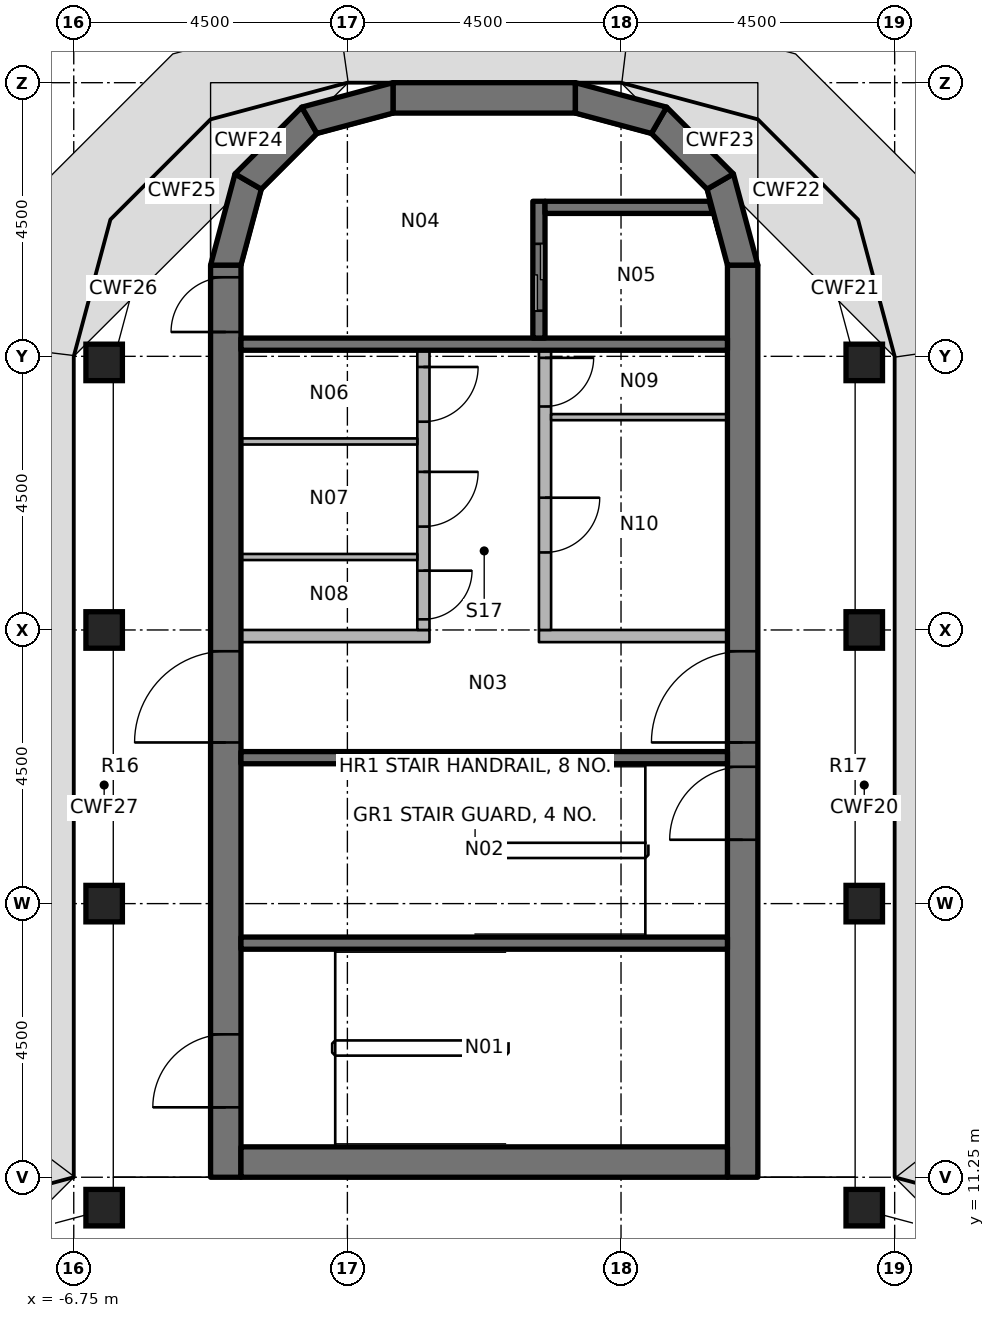
"""IFC4 building model, lengths in metres.
Left out: names, types, materials, properties, quantities, classifications, styles, units other than length and angle.
Written with IfcOpenShell. Run it as: python <this file> out.ifc"""

import sys

from ifc_helpers import new_model, si_unit, direction, frame, frame_2d, origin, origin_2d, place, context, subcontext, project, spatial, polyline, rectangle, outline, extrude, element, fill, save


model = new_model("IFC4")
c1 = context("Model", 3, precision=1e-05, world=origin(), true_north=direction((0.0, 1.0)))
c2 = subcontext(c1, "Body", "Model", "MODEL_VIEW")
j1 = project(units=[si_unit("LENGTHUNIT", "METRE"), si_unit("PLANEANGLEUNIT", "RADIAN")], contexts=[c1])
p1 = place(None, origin())
s1 = spatial("IfcSite", under=j1, at=p1, CompositionType="ELEMENT")
p2 = place(p1, origin())
s2 = spatial("IfcBuilding", under=s1, at=p2, CompositionType="ELEMENT")
p3 = place(p2, frame((0.0, 0.0, 291.6)))
s3 = spatial("IfcBuildingStorey", under=s2, at=p3, CompositionType="ELEMENT", Elevation=291.6)
for number, where, z_axis, x_axis in (
    (1, (-6.25, 10.75, 0.0), (0.0, 0.0, 1.0), (1.0, 0.0, 0.0)),
    (2, (-6.25, 15.75, 0.0), (0.0, 0.0, 1.0), (1.0, 0.0, 0.0)),
    (3, (-6.25, 20.25, 0.0), (0.0, 0.0, 1.0), (1.0, 0.0, 0.0)),
    (4, (-6.25, 24.65, 0.0), (0.0, 0.0, 1.0), (1.0, 0.0, 0.0)),
    (5, (6.25, 10.75, 0.0), (0.0, 0.0, 1.0), (1.0, 0.0, 0.0)),
    (6, (6.25, 15.75, 0.0), (0.0, 0.0, 1.0), (1.0, 0.0, 0.0)),
    (7, (6.25, 20.25, 0.0), (0.0, 0.0, 1.0), (1.0, 0.0, 0.0)),
    (8, (6.25, 24.65, 0.0), (0.0, 0.0, 1.0), (1.0, 0.0, 0.0)),
):
    element("IfcColumn", number, at=place(p3, frame(where, z_axis=z_axis, x_axis=x_axis)), inside=s3, PredefinedType="COLUMN", context=c2, shape_type="SweptSolid", body=[
        extrude(rectangle(XDim=0.6, YDim=0.6, at=origin_2d()), origin(), (0.0, 0.0, 1.0), 3.45),
    ])
p4 = place(p3, frame((-4.25, 11.25, 0.0), z_axis=(0.0, 0.0, 1.0), x_axis=(0.0, 1.0, 0.0)))
e9 = element("IfcWall", 9, at=p4, inside=s3, PredefinedType="SHEAR", context=c2, shape_type="SweptSolid", body=[
    extrude(rectangle(XDim=15.0, YDim=0.5, at=frame_2d((7.5, 0.0))), origin(), (0.0, 0.0, 1.0), 3.6),
])
p5 = place(p4, frame((7.15, 0.0, 0.0)))
e10 = element("IfcOpeningElement", 10, at=p5, cuts=e9, PredefinedType="OPENING", context=c2, shape_type="SweptSolid", body=[
    extrude(rectangle(XDim=1.5, YDim=2.3, at=frame_2d((0.75, 1.15))), frame((0.0, 0.26, 0.0), z_axis=(0.0, -1.0, 0.0), x_axis=(1.0, 0.0, 0.0)), (0.0, 0.0, 1.0), 0.52),
])
p6 = place(p4, frame((13.9, 0.0, 0.0)))
e11 = element("IfcOpeningElement", 11, at=p6, cuts=e9, PredefinedType="OPENING", context=c2, shape_type="SweptSolid", body=[
    extrude(rectangle(XDim=0.9, YDim=2.1, at=frame_2d((0.45, 1.05))), frame((0.0, 0.26, 0.0), z_axis=(0.0, -1.0, 0.0), x_axis=(1.0, 0.0, 0.0)), (0.0, 0.0, 1.0), 0.52),
])
p7 = place(p4, frame((1.15, 0.0, 0.0)))
e12 = element("IfcOpeningElement", 12, at=p7, cuts=e9, PredefinedType="OPENING", context=c2, shape_type="SweptSolid", body=[
    extrude(rectangle(XDim=1.2, YDim=2.1, at=frame_2d((0.6, 1.05))), frame((0.0, 0.26, 0.0), z_axis=(0.0, -1.0, 0.0), x_axis=(1.0, 0.0, 0.0)), (0.0, 0.0, 1.0), 0.52),
])
p8 = place(p3, frame((4.25, 11.25, 0.0), z_axis=(0.0, 0.0, 1.0), x_axis=(0.0, 1.0, 0.0)))
e13 = element("IfcWall", 13, at=p8, inside=s3, PredefinedType="SHEAR", context=c2, shape_type="SweptSolid", body=[
    extrude(rectangle(XDim=15.0, YDim=0.5, at=frame_2d((7.5, 0.0))), origin(), (0.0, 0.0, 1.0), 3.6),
])
p9 = place(p8, frame((7.15, 0.0, 0.0)))
e14 = element("IfcOpeningElement", 14, at=p9, cuts=e13, PredefinedType="OPENING", context=c2, shape_type="SweptSolid", body=[
    extrude(rectangle(XDim=1.5, YDim=2.3, at=frame_2d((0.75, 1.15))), frame((0.0, 0.26, 0.0), z_axis=(0.0, -1.0, 0.0), x_axis=(1.0, 0.0, 0.0)), (0.0, 0.0, 1.0), 0.52),
])
p10 = place(p8, frame((5.55, 0.0, 0.0)))
e15 = element("IfcOpeningElement", 15, at=p10, cuts=e13, PredefinedType="OPENING", context=c2, shape_type="SweptSolid", body=[
    extrude(rectangle(XDim=1.2, YDim=2.1, at=frame_2d((0.6, 1.05))), frame((0.0, 0.26, 0.0), z_axis=(0.0, -1.0, 0.0), x_axis=(1.0, 0.0, 0.0)), (0.0, 0.0, 1.0), 0.52),
])
p11 = place(p3, frame((-4.0, 11.5, 0.0), z_axis=(0.0, 0.0, 1.0), x_axis=(1.0, 0.0, 0.0)))
e16 = element("IfcWall", 16, at=p11, inside=s3, PredefinedType="SHEAR", context=c2, shape_type="SweptSolid", body=[
    extrude(rectangle(XDim=8.0, YDim=0.5, at=frame_2d((4.0, 0.0))), origin(), (0.0, 0.0, 1.0), 3.6),
])
p12 = place(p3, frame((-1.5, 29.0, 0.0), z_axis=(0.0, 0.0, 1.0), x_axis=(1.0, 0.0, 0.0)))
e17 = element("IfcWall", 17, at=p12, inside=s3, PredefinedType="SHEAR", context=c2, shape_type="SweptSolid", body=[
    extrude(rectangle(XDim=3.0, YDim=0.5, at=frame_2d((1.5, 0.0))), origin(), (0.0, 0.0, 1.0), 3.6),
])
p13 = place(p3, origin())
e18 = element("IfcWall", 18, at=p13, inside=s3, PredefinedType="SHEAR", context=c2, shape_type="SweptSolid", body=[
    extrude(outline(polyline([(-4.5, 26.25), (-4.098, 27.75), (-3.665, 27.5), (-4.0, 26.25), (-4.5, 26.25)])), origin(), (0.0, 0.0, 1.0), 3.6),
])
p14 = place(p3, origin())
e19 = element("IfcWall", 19, at=p14, inside=s3, PredefinedType="SHEAR", context=c2, shape_type="SweptSolid", body=[
    extrude(outline(polyline([(-4.098, 27.75), (-3.0, 28.848), (-2.75, 28.415), (-3.665, 27.5), (-4.098, 27.75)])), origin(), (0.0, 0.0, 1.0), 3.6),
])
p15 = place(p3, origin())
e20 = element("IfcWall", 20, at=p15, inside=s3, PredefinedType="SHEAR", context=c2, shape_type="SweptSolid", body=[
    extrude(outline(polyline([(-3.0, 28.848), (-1.5, 29.25), (-1.5, 28.75), (-2.75, 28.415), (-3.0, 28.848)])), origin(), (0.0, 0.0, 1.0), 3.6),
])
p16 = place(p3, origin())
e21 = element("IfcWall", 21, at=p16, inside=s3, PredefinedType="SHEAR", context=c2, shape_type="SweptSolid", body=[
    extrude(outline(polyline([(4.5, 26.25), (4.098, 27.75), (3.665, 27.5), (4.0, 26.25), (4.5, 26.25)])), origin(), (0.0, 0.0, 1.0), 3.6),
])
p17 = place(p3, origin())
e22 = element("IfcWall", 22, at=p17, inside=s3, PredefinedType="SHEAR", context=c2, shape_type="SweptSolid", body=[
    extrude(outline(polyline([(4.098, 27.75), (3.0, 28.848), (2.75, 28.415), (3.665, 27.5), (4.098, 27.75)])), origin(), (0.0, 0.0, 1.0), 3.6),
])
p18 = place(p3, origin())
e23 = element("IfcWall", 23, at=p18, inside=s3, PredefinedType="SHEAR", context=c2, shape_type="SweptSolid", body=[
    extrude(outline(polyline([(3.0, 28.848), (1.5, 29.25), (1.5, 28.75), (2.75, 28.415), (3.0, 28.848)])), origin(), (0.0, 0.0, 1.0), 3.6),
])
p19 = place(p3, frame((-4.0, 24.95, 0.0), z_axis=(0.0, 0.0, 1.0), x_axis=(1.0, 0.0, 0.0)))
e24 = element("IfcWall", 24, at=p19, inside=s3, PredefinedType="SHEAR", context=c2, shape_type="SweptSolid", body=[
    extrude(rectangle(XDim=8.0, YDim=0.2, at=frame_2d((4.0, 0.0))), origin(), (0.0, 0.0, 1.0), 3.45),
])
p20 = place(p3, frame((0.9, 27.3, 0.0), z_axis=(0.0, 0.0, 1.0), x_axis=(0.0, -1.0, 0.0)))
e25 = element("IfcWall", 25, at=p20, inside=s3, PredefinedType="SHEAR", context=c2, shape_type="SweptSolid", body=[
    extrude(rectangle(XDim=2.25, YDim=0.2, at=frame_2d((1.125, 0.0))), origin(), (0.0, 0.0, 1.0), 3.45),
])
p21 = place(p20, frame((0.7, 0.0, 0.0)))
e26 = element("IfcOpeningElement", 26, at=p21, cuts=e25, PredefinedType="OPENING", context=c2, shape_type="SweptSolid", body=[
    extrude(rectangle(XDim=1.1, YDim=2.3, at=frame_2d((0.55, 1.15))), frame((0.0, 0.11, 0.0), z_axis=(0.0, -1.0, 0.0), x_axis=(1.0, 0.0, 0.0)), (0.0, 0.0, 1.0), 0.22),
])
p22 = place(p3, origin())
e27 = element("IfcWall", 27, at=p22, inside=s3, PredefinedType="SHEAR", context=c2, shape_type="SweptSolid", body=[
    extrude(outline(polyline([(1.0, 27.1), (3.755, 27.1), (3.701, 27.3), (1.0, 27.3), (1.0, 27.1)])), origin(), (0.0, 0.0, 1.0), 3.45),
])
for number, where, z_axis, x_axis in (
    (28, (-4.0, 18.15, 0.0), (0.0, 0.0, 1.0), (1.0, 0.0, 0.0)),
    (29, (-4.0, 15.1, 0.0), (0.0, 0.0, 1.0), (1.0, 0.0, 0.0)),
):
    element("IfcWall", number, at=place(p3, frame(where, z_axis=z_axis, x_axis=x_axis)), inside=s3, PredefinedType="SHEAR", context=c2, shape_type="SweptSolid", body=[
        extrude(rectangle(XDim=8.0, YDim=0.2, at=frame_2d((4.0, 0.0))), origin(), (0.0, 0.0, 1.0), 3.45),
    ])
p23 = place(p3, frame((-4.0, 20.15, 0.0), z_axis=(0.0, 0.0, 1.0), x_axis=(1.0, 0.0, 0.0)))
e30 = element("IfcWall", 30, at=p23, inside=s3, PredefinedType="PARTITIONING", context=c2, shape_type="SweptSolid", body=[
    extrude(rectangle(XDim=3.1, YDim=0.2, at=frame_2d((1.55, 0.0))), origin(), (0.0, 0.0, 1.0), 3.45),
])
p24 = place(p3, frame((-1.0, 24.85, 0.0), z_axis=(0.0, 0.0, 1.0), x_axis=(0.0, -1.0, 0.0)))
e31 = element("IfcWall", 31, at=p24, inside=s3, PredefinedType="PARTITIONING", context=c2, shape_type="SweptSolid", body=[
    extrude(rectangle(XDim=4.6, YDim=0.2, at=frame_2d((2.3, 0.0))), origin(), (0.0, 0.0, 1.0), 3.45),
])
p25 = place(p24, frame((0.275, 0.0, 0.0)))
e32 = element("IfcOpeningElement", 32, at=p25, cuts=e31, PredefinedType="OPENING", context=c2, shape_type="SweptSolid", body=[
    extrude(rectangle(XDim=0.9, YDim=2.1, at=frame_2d((0.45, 1.05))), frame((0.0, 0.11, 0.0), z_axis=(0.0, -1.0, 0.0), x_axis=(1.0, 0.0, 0.0)), (0.0, 0.0, 1.0), 0.22),
])
p26 = place(p24, frame((2.0, 0.0, 0.0)))
e33 = element("IfcOpeningElement", 33, at=p26, cuts=e31, PredefinedType="OPENING", context=c2, shape_type="SweptSolid", body=[
    extrude(rectangle(XDim=0.9, YDim=2.1, at=frame_2d((0.45, 1.05))), frame((0.0, 0.11, 0.0), z_axis=(0.0, -1.0, 0.0), x_axis=(1.0, 0.0, 0.0)), (0.0, 0.0, 1.0), 0.22),
])
p27 = place(p24, frame((3.625, 0.0, 0.0)))
e34 = element("IfcOpeningElement", 34, at=p27, cuts=e31, PredefinedType="OPENING", context=c2, shape_type="SweptSolid", body=[
    extrude(rectangle(XDim=0.8, YDim=2.1, at=frame_2d((0.4, 1.05))), frame((0.0, 0.11, 0.0), z_axis=(0.0, -1.0, 0.0), x_axis=(1.0, 0.0, 0.0)), (0.0, 0.0, 1.0), 0.22),
])
p28 = place(p3, frame((0.9, 20.15, 0.0), z_axis=(0.0, 0.0, 1.0), x_axis=(1.0, 0.0, 0.0)))
e35 = element("IfcWall", 35, at=p28, inside=s3, PredefinedType="PARTITIONING", context=c2, shape_type="SweptSolid", body=[
    extrude(rectangle(XDim=3.1, YDim=0.2, at=frame_2d((1.55, 0.0))), origin(), (0.0, 0.0, 1.0), 3.45),
])
p29 = place(p3, frame((1.0, 24.85, 0.0), z_axis=(0.0, 0.0, 1.0), x_axis=(0.0, -1.0, 0.0)))
e36 = element("IfcWall", 36, at=p29, inside=s3, PredefinedType="PARTITIONING", context=c2, shape_type="SweptSolid", body=[
    extrude(rectangle(XDim=4.6, YDim=0.2, at=frame_2d((2.3, 0.0))), origin(), (0.0, 0.0, 1.0), 3.45),
])
p30 = place(p29, frame((0.125, 0.0, 0.0)))
e37 = element("IfcOpeningElement", 37, at=p30, cuts=e36, PredefinedType="OPENING", context=c2, shape_type="SweptSolid", body=[
    extrude(rectangle(XDim=0.8, YDim=2.1, at=frame_2d((0.4, 1.05))), frame((0.0, 0.11, 0.0), z_axis=(0.0, -1.0, 0.0), x_axis=(1.0, 0.0, 0.0)), (0.0, 0.0, 1.0), 0.22),
])
p31 = place(p29, frame((2.425, 0.0, 0.0)))
e38 = element("IfcOpeningElement", 38, at=p31, cuts=e36, PredefinedType="OPENING", context=c2, shape_type="SweptSolid", body=[
    extrude(rectangle(XDim=0.9, YDim=2.1, at=frame_2d((0.45, 1.05))), frame((0.0, 0.11, 0.0), z_axis=(0.0, -1.0, 0.0), x_axis=(1.0, 0.0, 0.0)), (0.0, 0.0, 1.0), 0.22),
])
for number, where, z_axis, x_axis in (
    (39, (-4.0, 23.35, 0.0), (0.0, 0.0, 1.0), (1.0, 0.0, 0.0)),
    (40, (-4.0, 21.45, 0.0), (0.0, 0.0, 1.0), (1.0, 0.0, 0.0)),
    (41, (1.1, 23.75, 0.0), (0.0, 0.0, 1.0), (1.0, 0.0, 0.0)),
):
    element("IfcWall", number, at=place(p3, frame(where, z_axis=z_axis, x_axis=x_axis)), inside=s3, PredefinedType="PARTITIONING", context=c2, shape_type="SweptSolid", body=[
        extrude(rectangle(XDim=2.9, YDim=0.1, at=frame_2d((1.45, 0.0))), origin(), (0.0, 0.0, 1.0), 3.45),
    ])
p32 = place(p5, origin())
e42 = element("IfcDoor", 42, at=p32, inside=s3, OperationType="DOUBLE_DOOR_SINGLE_SWING", PredefinedType="DOOR", context=c2, shape_type="SweptSolid", body=[
    extrude(rectangle(XDim=1.5, YDim=2.3, at=frame_2d((0.75, 1.15))), frame((0.0, 0.025, 0.0), z_axis=(0.0, -1.0, 0.0), x_axis=(1.0, 0.0, 0.0)), (0.0, 0.0, 1.0), 0.05),
])
fill(e10, e42)
p33 = place(p9, origin())
e43 = element("IfcDoor", 43, at=p33, inside=s3, OperationType="DOUBLE_DOOR_SINGLE_SWING", PredefinedType="DOOR", context=c2, shape_type="SweptSolid", body=[
    extrude(rectangle(XDim=1.5, YDim=2.3, at=frame_2d((0.75, 1.15))), frame((0.0, 0.025, 0.0), z_axis=(0.0, -1.0, 0.0), x_axis=(1.0, 0.0, 0.0)), (0.0, 0.0, 1.0), 0.05),
])
fill(e14, e43)
p34 = place(p6, origin())
e44 = element("IfcDoor", 44, at=p34, inside=s3, OperationType="SINGLE_SWING_LEFT", PredefinedType="DOOR", context=c2, shape_type="SweptSolid", body=[
    extrude(rectangle(XDim=0.9, YDim=2.1, at=frame_2d((0.45, 1.05))), frame((0.0, 0.025, 0.0), z_axis=(0.0, -1.0, 0.0), x_axis=(1.0, 0.0, 0.0)), (0.0, 0.0, 1.0), 0.05),
])
fill(e11, e44)
p35 = place(p10, origin())
e45 = element("IfcDoor", 45, at=p35, inside=s3, OperationType="SINGLE_SWING_RIGHT", PredefinedType="DOOR", context=c2, shape_type="SweptSolid", body=[
    extrude(rectangle(XDim=1.2, YDim=2.1, at=frame_2d((0.6, 1.05))), frame((0.0, 0.025, 0.0), z_axis=(0.0, -1.0, 0.0), x_axis=(1.0, 0.0, 0.0)), (0.0, 0.0, 1.0), 0.05),
])
fill(e15, e45)
p36 = place(p7, origin())
e46 = element("IfcDoor", 46, at=p36, inside=s3, OperationType="SINGLE_SWING_LEFT", PredefinedType="DOOR", context=c2, shape_type="SweptSolid", body=[
    extrude(rectangle(XDim=1.2, YDim=2.1, at=frame_2d((0.6, 1.05))), frame((0.0, 0.025, 0.0), z_axis=(0.0, -1.0, 0.0), x_axis=(1.0, 0.0, 0.0)), (0.0, 0.0, 1.0), 0.05),
])
fill(e12, e46)
p37 = place(p21, origin())
e47 = element("IfcDoor", 47, at=p37, inside=s3, OperationType="DOUBLE_DOOR_SLIDING", PredefinedType="DOOR", context=c2, shape_type="SweptSolid", body=[
    extrude(rectangle(XDim=1.1, YDim=2.3, at=frame_2d((0.55, 1.15))), frame((0.0, 0.025, 0.0), z_axis=(0.0, -1.0, 0.0), x_axis=(1.0, 0.0, 0.0)), (0.0, 0.0, 1.0), 0.05),
])
fill(e26, e47)
p38 = place(p25, origin())
e48 = element("IfcDoor", 48, at=p38, inside=s3, OperationType="SINGLE_SWING_LEFT", PredefinedType="DOOR", context=c2, shape_type="SweptSolid", body=[
    extrude(rectangle(XDim=0.9, YDim=2.1, at=frame_2d((0.45, 1.05))), frame((0.0, 0.025, 0.0), z_axis=(0.0, -1.0, 0.0), x_axis=(1.0, 0.0, 0.0)), (0.0, 0.0, 1.0), 0.05),
])
fill(e32, e48)
p39 = place(p26, origin())
e49 = element("IfcDoor", 49, at=p39, inside=s3, OperationType="SINGLE_SWING_LEFT", PredefinedType="DOOR", context=c2, shape_type="SweptSolid", body=[
    extrude(rectangle(XDim=0.9, YDim=2.1, at=frame_2d((0.45, 1.05))), frame((0.0, 0.025, 0.0), z_axis=(0.0, -1.0, 0.0), x_axis=(1.0, 0.0, 0.0)), (0.0, 0.0, 1.0), 0.05),
])
fill(e33, e49)
p40 = place(p27, origin())
e50 = element("IfcDoor", 50, at=p40, inside=s3, OperationType="SINGLE_SWING_LEFT", PredefinedType="DOOR", context=c2, shape_type="SweptSolid", body=[
    extrude(rectangle(XDim=0.8, YDim=2.1, at=frame_2d((0.4, 1.05))), frame((0.0, 0.025, 0.0), z_axis=(0.0, -1.0, 0.0), x_axis=(1.0, 0.0, 0.0)), (0.0, 0.0, 1.0), 0.05),
])
fill(e34, e50)
p41 = place(p30, origin())
e51 = element("IfcDoor", 51, at=p41, inside=s3, OperationType="SINGLE_SWING_RIGHT", PredefinedType="DOOR", context=c2, shape_type="SweptSolid", body=[
    extrude(rectangle(XDim=0.8, YDim=2.1, at=frame_2d((0.4, 1.05))), frame((0.0, 0.025, 0.0), z_axis=(0.0, -1.0, 0.0), x_axis=(1.0, 0.0, 0.0)), (0.0, 0.0, 1.0), 0.05),
])
fill(e37, e51)
p42 = place(p31, origin())
e52 = element("IfcDoor", 52, at=p42, inside=s3, OperationType="SINGLE_SWING_LEFT", PredefinedType="DOOR", context=c2, shape_type="SweptSolid", body=[
    extrude(rectangle(XDim=0.9, YDim=2.1, at=frame_2d((0.45, 1.05))), frame((0.0, 0.025, 0.0), z_axis=(0.0, -1.0, 0.0), x_axis=(1.0, 0.0, 0.0)), (0.0, 0.0, 1.0), 0.05),
])
fill(e38, e52)
save(model, sys.argv[1])
